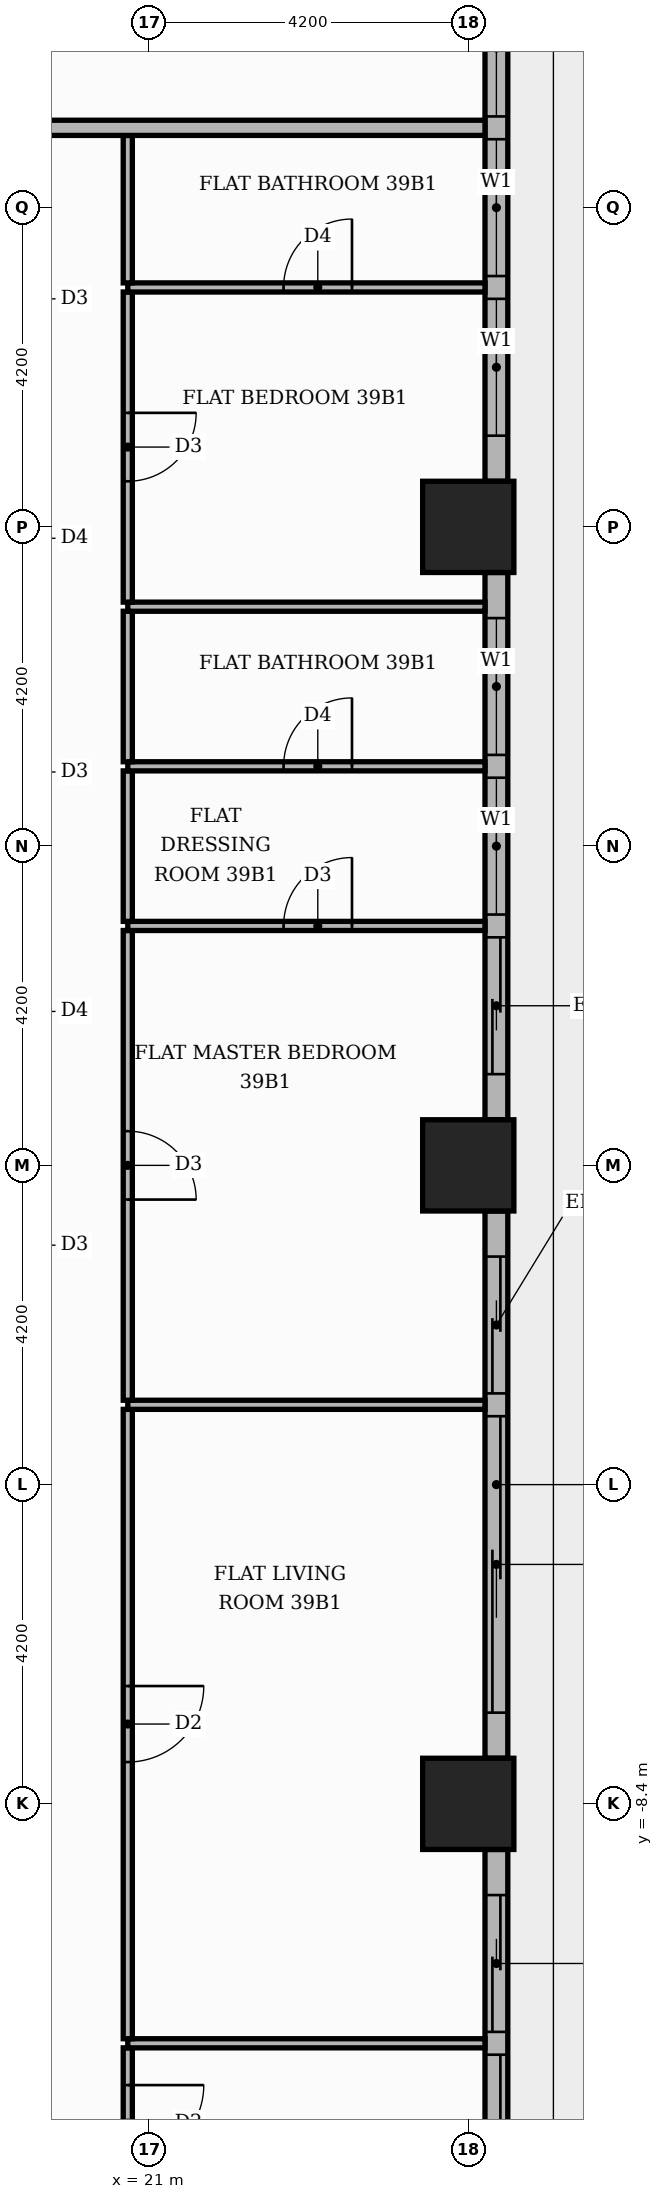
"""IFC4 building model, lengths in metres.
Left out: names, types, materials, properties, quantities, classifications, styles, units other than length and angle.
Written with IfcOpenShell. Run it as: python <this file> out.ifc"""

import sys

from ifc_helpers import new_model, si_unit, direction, frame, frame_2d, origin, origin_2d, place, context, subcontext, project, spatial, rectangle, extrude, element, fill, save


model = new_model("IFC4")
c1 = context("Model", 3, precision=1e-05, world=origin(), true_north=direction((0.0, 1.0)))
c2 = subcontext(c1, "Body", "Model", "MODEL_VIEW")
j1 = project(units=[si_unit("LENGTHUNIT", "METRE"), si_unit("PLANEANGLEUNIT", "RADIAN")], contexts=[c1])
p1 = place(None, origin())
s1 = spatial("IfcSite", under=j1, at=p1, CompositionType="ELEMENT")
p2 = place(p1, origin())
s2 = spatial("IfcBuilding", under=s1, at=p2, CompositionType="ELEMENT")
p3 = place(p2, frame((0.0, 0.0, 165.0)))
s3 = spatial("IfcBuildingStorey", under=s2, at=p3, CompositionType="ELEMENT", Elevation=165.0)
for number, where, z_axis, x_axis in (
    (1, (25.2, 0.0, 0.0), (0.0, 0.0, 1.0), (1.0, 0.0, 0.0)),
    (2, (25.2, 8.4, 0.0), (0.0, 0.0, 1.0), (1.0, 0.0, 0.0)),
    (3, (25.2, -8.4, 0.0), (0.0, 0.0, 1.0), (1.0, 0.0, 0.0)),
):
    element("IfcColumn", number, at=place(p3, frame(where, z_axis=z_axis, x_axis=x_axis)), inside=s3, PredefinedType="COLUMN", context=c2, shape_type="SweptSolid", body=[
        extrude(rectangle(XDim=1.2, YDim=1.2, at=origin_2d()), origin(), (0.0, 0.0, 1.0), 3.9),
    ])
p4 = place(p3, frame((25.57, -16.2, 0.0), z_axis=(0.0, 0.0, 1.0), x_axis=(0.0, 1.0, 0.0)))
e4 = element("IfcWall", 4, at=p4, inside=s3, PredefinedType="STANDARD", context=c2, shape_type="SweptSolid", body=[
    extrude(rectangle(XDim=7.2, YDim=0.3, at=frame_2d((3.6, 0.0))), origin(), (0.0, 0.0, 1.0), 3.48),
])
p5 = place(p4, frame((0.6, 0.0, 0.0)))
e5 = element("IfcOpeningElement", 5, at=p5, cuts=e4, PredefinedType="OPENING", context=c2, shape_type="SweptSolid", body=[
    extrude(rectangle(XDim=3.9, YDim=2.4, at=frame_2d((1.95, 1.2))), frame((0.0, 0.16, 0.0), z_axis=(0.0, -1.0, 0.0), x_axis=(1.0, 0.0, 0.0)), (0.0, 0.0, 1.0), 0.32),
])
p6 = place(p4, frame((4.8, 0.0, 0.0)))
e6 = element("IfcOpeningElement", 6, at=p6, cuts=e4, PredefinedType="OPENING", context=c2, shape_type="SweptSolid", body=[
    extrude(rectangle(XDim=1.8, YDim=2.4, at=frame_2d((0.9, 1.2))), frame((0.0, 0.16, 0.0), z_axis=(0.0, -1.0, 0.0), x_axis=(1.0, 0.0, 0.0)), (0.0, 0.0, 1.0), 0.32),
])
p7 = place(p3, frame((25.57, -7.8, 0.0), z_axis=(0.0, 0.0, 1.0), x_axis=(0.0, 1.0, 0.0)))
e7 = element("IfcWall", 7, at=p7, inside=s3, PredefinedType="STANDARD", context=c2, shape_type="SweptSolid", body=[
    extrude(rectangle(XDim=7.2, YDim=0.3, at=frame_2d((3.6, 0.0))), origin(), (0.0, 0.0, 1.0), 3.48),
])
p8 = place(p7, frame((0.6, 0.0, 0.0)))
e8 = element("IfcOpeningElement", 8, at=p8, cuts=e7, PredefinedType="OPENING", context=c2, shape_type="SweptSolid", body=[
    extrude(rectangle(XDim=3.9, YDim=2.4, at=frame_2d((1.95, 1.2))), frame((0.0, 0.16, 0.0), z_axis=(0.0, -1.0, 0.0), x_axis=(1.0, 0.0, 0.0)), (0.0, 0.0, 1.0), 0.32),
])
p9 = place(p7, frame((4.8, 0.0, 0.0)))
e9 = element("IfcOpeningElement", 9, at=p9, cuts=e7, PredefinedType="OPENING", context=c2, shape_type="SweptSolid", body=[
    extrude(rectangle(XDim=1.8, YDim=2.4, at=frame_2d((0.9, 1.2))), frame((0.0, 0.16, 0.0), z_axis=(0.0, -1.0, 0.0), x_axis=(1.0, 0.0, 0.0)), (0.0, 0.0, 1.0), 0.32),
])
p10 = place(p3, frame((25.57, 0.6, 0.0), z_axis=(0.0, 0.0, 1.0), x_axis=(0.0, 1.0, 0.0)))
e10 = element("IfcWall", 10, at=p10, inside=s3, PredefinedType="STANDARD", context=c2, shape_type="SweptSolid", body=[
    extrude(rectangle(XDim=7.2, YDim=0.3, at=frame_2d((3.6, 0.0))), origin(), (0.0, 0.0, 1.0), 3.48),
])
p11 = place(p10, frame((0.6, 0.0, 0.0)))
e11 = element("IfcOpeningElement", 11, at=p11, cuts=e10, PredefinedType="OPENING", context=c2, shape_type="SweptSolid", body=[
    extrude(rectangle(XDim=1.8, YDim=2.4, at=frame_2d((0.9, 1.2))), frame((0.0, 0.16, 0.0), z_axis=(0.0, -1.0, 0.0), x_axis=(1.0, 0.0, 0.0)), (0.0, 0.0, 1.0), 0.32),
])
p12 = place(p10, frame((2.7, 0.0, 0.9)))
e12 = element("IfcOpeningElement", 12, at=p12, cuts=e10, PredefinedType="OPENING", context=c2, shape_type="SweptSolid", body=[
    extrude(rectangle(XDim=1.8, YDim=2.1, at=frame_2d((0.9, 1.05))), frame((0.0, 0.16, 0.0), z_axis=(0.0, -1.0, 0.0), x_axis=(1.0, 0.0, 0.0)), (0.0, 0.0, 1.0), 0.32),
])
p13 = place(p10, frame((4.8, 0.0, 0.9)))
e13 = element("IfcOpeningElement", 13, at=p13, cuts=e10, PredefinedType="OPENING", context=c2, shape_type="SweptSolid", body=[
    extrude(rectangle(XDim=1.8, YDim=2.1, at=frame_2d((0.9, 1.05))), frame((0.0, 0.16, 0.0), z_axis=(0.0, -1.0, 0.0), x_axis=(1.0, 0.0, 0.0)), (0.0, 0.0, 1.0), 0.32),
])
p14 = place(p3, frame((25.57, 9.0, 0.0), z_axis=(0.0, 0.0, 1.0), x_axis=(0.0, 1.0, 0.0)))
e14 = element("IfcWall", 14, at=p14, inside=s3, PredefinedType="STANDARD", context=c2, shape_type="SweptSolid", body=[
    extrude(rectangle(XDim=7.2, YDim=0.3, at=frame_2d((3.6, 0.0))), origin(), (0.0, 0.0, 1.0), 3.48),
])
p15 = place(p14, frame((0.6, 0.0, 0.9)))
e15 = element("IfcOpeningElement", 15, at=p15, cuts=e14, PredefinedType="OPENING", context=c2, shape_type="SweptSolid", body=[
    extrude(rectangle(XDim=1.8, YDim=2.1, at=frame_2d((0.9, 1.05))), frame((0.0, 0.16, 0.0), z_axis=(0.0, -1.0, 0.0), x_axis=(1.0, 0.0, 0.0)), (0.0, 0.0, 1.0), 0.32),
])
p16 = place(p14, frame((2.7, 0.0, 0.9)))
e16 = element("IfcOpeningElement", 16, at=p16, cuts=e14, PredefinedType="OPENING", context=c2, shape_type="SweptSolid", body=[
    extrude(rectangle(XDim=1.8, YDim=2.1, at=frame_2d((0.9, 1.05))), frame((0.0, 0.16, 0.0), z_axis=(0.0, -1.0, 0.0), x_axis=(1.0, 0.0, 0.0)), (0.0, 0.0, 1.0), 0.32),
])
p17 = place(p14, frame((4.8, 0.0, 0.9)))
e17 = element("IfcOpeningElement", 17, at=p17, cuts=e14, PredefinedType="OPENING", context=c2, shape_type="SweptSolid", body=[
    extrude(rectangle(XDim=1.8, YDim=2.1, at=frame_2d((0.9, 1.05))), frame((0.0, 0.16, 0.0), z_axis=(0.0, -1.0, 0.0), x_axis=(1.0, 0.0, 0.0)), (0.0, 0.0, 1.0), 0.32),
])
p18 = place(p3, frame((20.72, -13.59, 0.0), z_axis=(0.0, 0.0, 1.0), x_axis=(0.0, 1.0, 0.0)))
e18 = element("IfcWall", 18, at=p18, inside=s3, PredefinedType="PARTITIONING", context=c2, shape_type="SweptSolid", body=[
    extrude(rectangle(XDim=1.98, YDim=0.12, at=frame_2d((0.99, 0.0))), origin(), (0.0, 0.0, 1.0), 3.48),
])
p19 = place(p18, frame((0.49, 0.0, 0.0)))
e19 = element("IfcOpeningElement", 19, at=p19, cuts=e18, PredefinedType="OPENING", context=c2, shape_type="SweptSolid", body=[
    extrude(rectangle(XDim=1.0, YDim=2.1, at=frame_2d((0.5, 1.05))), frame((0.0, 0.07, 0.0), z_axis=(0.0, -1.0, 0.0), x_axis=(1.0, 0.0, 0.0)), (0.0, 0.0, 1.0), 0.14),
])
p20 = place(p3, frame((20.72, -11.55, 0.0), z_axis=(0.0, 0.0, 1.0), x_axis=(1.0, 0.0, 0.0)))
e20 = element("IfcWall", 20, at=p20, inside=s3, PredefinedType="PARTITIONING", context=c2, shape_type="SweptSolid", body=[
    extrude(rectangle(XDim=4.7, YDim=0.12, at=frame_2d((2.35, 0.0))), origin(), (0.0, 0.0, 1.0), 3.48),
])
p21 = place(p3, frame((20.72, -11.49, 0.0), z_axis=(0.0, 0.0, 1.0), x_axis=(0.0, 1.0, 0.0)))
e21 = element("IfcWall", 21, at=p21, inside=s3, PredefinedType="PARTITIONING", context=c2, shape_type="SweptSolid", body=[
    extrude(rectangle(XDim=8.28, YDim=0.12, at=frame_2d((4.14, 0.0))), origin(), (0.0, 0.0, 1.0), 3.48),
])
p22 = place(p21, frame((3.64, 0.0, 0.0)))
e22 = element("IfcOpeningElement", 22, at=p22, cuts=e21, PredefinedType="OPENING", context=c2, shape_type="SweptSolid", body=[
    extrude(rectangle(XDim=1.0, YDim=2.1, at=frame_2d((0.5, 1.05))), frame((0.0, 0.07, 0.0), z_axis=(0.0, -1.0, 0.0), x_axis=(1.0, 0.0, 0.0)), (0.0, 0.0, 1.0), 0.14),
])
p23 = place(p3, frame((20.72, -3.15, 0.0), z_axis=(0.0, 0.0, 1.0), x_axis=(1.0, 0.0, 0.0)))
e23 = element("IfcWall", 23, at=p23, inside=s3, PredefinedType="PARTITIONING", context=c2, shape_type="SweptSolid", body=[
    extrude(rectangle(XDim=4.7, YDim=0.12, at=frame_2d((2.35, 0.0))), origin(), (0.0, 0.0, 1.0), 3.48),
])
p24 = place(p3, frame((20.72, -3.09, 0.0), z_axis=(0.0, 0.0, 1.0), x_axis=(0.0, 1.0, 0.0)))
e24 = element("IfcWall", 24, at=p24, inside=s3, PredefinedType="PARTITIONING", context=c2, shape_type="SweptSolid", body=[
    extrude(rectangle(XDim=6.18, YDim=0.12, at=frame_2d((3.09, 0.0))), origin(), (0.0, 0.0, 1.0), 3.48),
])
p25 = place(p24, frame((2.64, 0.0, 0.0)))
e25 = element("IfcOpeningElement", 25, at=p25, cuts=e24, PredefinedType="OPENING", context=c2, shape_type="SweptSolid", body=[
    extrude(rectangle(XDim=0.9, YDim=2.1, at=frame_2d((0.45, 1.05))), frame((0.0, 0.07, 0.0), z_axis=(0.0, -1.0, 0.0), x_axis=(1.0, 0.0, 0.0)), (0.0, 0.0, 1.0), 0.14),
])
p26 = place(p3, frame((20.72, 3.15, 0.0), z_axis=(0.0, 0.0, 1.0), x_axis=(1.0, 0.0, 0.0)))
e26 = element("IfcWall", 26, at=p26, inside=s3, PredefinedType="PARTITIONING", context=c2, shape_type="SweptSolid", body=[
    extrude(rectangle(XDim=4.7, YDim=0.12, at=frame_2d((2.35, 0.0))), origin(), (0.0, 0.0, 1.0), 3.48),
])
p27 = place(p26, frame((2.05, 0.0, 0.0)))
e27 = element("IfcOpeningElement", 27, at=p27, cuts=e26, PredefinedType="OPENING", context=c2, shape_type="SweptSolid", body=[
    extrude(rectangle(XDim=0.9, YDim=2.1, at=frame_2d((0.45, 1.05))), frame((0.0, 0.07, 0.0), z_axis=(0.0, -1.0, 0.0), x_axis=(1.0, 0.0, 0.0)), (0.0, 0.0, 1.0), 0.14),
])
p28 = place(p3, frame((20.72, 3.21, 0.0), z_axis=(0.0, 0.0, 1.0), x_axis=(0.0, 1.0, 0.0)))
e28 = element("IfcWall", 28, at=p28, inside=s3, PredefinedType="PARTITIONING", context=c2, shape_type="SweptSolid", body=[
    extrude(rectangle(XDim=1.98, YDim=0.12, at=frame_2d((0.99, 0.0))), origin(), (0.0, 0.0, 1.0), 3.48),
])
p29 = place(p3, frame((20.72, 5.25, 0.0), z_axis=(0.0, 0.0, 1.0), x_axis=(1.0, 0.0, 0.0)))
e29 = element("IfcWall", 29, at=p29, inside=s3, PredefinedType="PARTITIONING", context=c2, shape_type="SweptSolid", body=[
    extrude(rectangle(XDim=4.7, YDim=0.12, at=frame_2d((2.35, 0.0))), origin(), (0.0, 0.0, 1.0), 3.48),
])
p30 = place(p29, frame((2.05, 0.0, 0.0)))
e30 = element("IfcOpeningElement", 30, at=p30, cuts=e29, PredefinedType="OPENING", context=c2, shape_type="SweptSolid", body=[
    extrude(rectangle(XDim=0.9, YDim=2.1, at=frame_2d((0.45, 1.05))), frame((0.0, 0.07, 0.0), z_axis=(0.0, -1.0, 0.0), x_axis=(1.0, 0.0, 0.0)), (0.0, 0.0, 1.0), 0.14),
])
p31 = place(p3, frame((20.72, 5.31, 0.0), z_axis=(0.0, 0.0, 1.0), x_axis=(0.0, 1.0, 0.0)))
e31 = element("IfcWall", 31, at=p31, inside=s3, PredefinedType="PARTITIONING", context=c2, shape_type="SweptSolid", body=[
    extrude(rectangle(XDim=1.98, YDim=0.12, at=frame_2d((0.99, 0.0))), origin(), (0.0, 0.0, 1.0), 3.48),
])
p32 = place(p3, frame((20.72, 7.35, 0.0), z_axis=(0.0, 0.0, 1.0), x_axis=(1.0, 0.0, 0.0)))
e32 = element("IfcWall", 32, at=p32, inside=s3, PredefinedType="PARTITIONING", context=c2, shape_type="SweptSolid", body=[
    extrude(rectangle(XDim=4.7, YDim=0.12, at=frame_2d((2.35, 0.0))), origin(), (0.0, 0.0, 1.0), 3.48),
])
p33 = place(p3, frame((20.72, 7.41, 0.0), z_axis=(0.0, 0.0, 1.0), x_axis=(0.0, 1.0, 0.0)))
e33 = element("IfcWall", 33, at=p33, inside=s3, PredefinedType="PARTITIONING", context=c2, shape_type="SweptSolid", body=[
    extrude(rectangle(XDim=4.08, YDim=0.12, at=frame_2d((2.04, 0.0))), origin(), (0.0, 0.0, 1.0), 3.48),
])
p34 = place(p33, frame((1.59, 0.0, 0.0)))
e34 = element("IfcOpeningElement", 34, at=p34, cuts=e33, PredefinedType="OPENING", context=c2, shape_type="SweptSolid", body=[
    extrude(rectangle(XDim=0.9, YDim=2.1, at=frame_2d((0.45, 1.05))), frame((0.0, 0.07, 0.0), z_axis=(0.0, -1.0, 0.0), x_axis=(1.0, 0.0, 0.0)), (0.0, 0.0, 1.0), 0.14),
])
p35 = place(p3, frame((20.72, 11.55, 0.0), z_axis=(0.0, 0.0, 1.0), x_axis=(1.0, 0.0, 0.0)))
e35 = element("IfcWall", 35, at=p35, inside=s3, PredefinedType="PARTITIONING", context=c2, shape_type="SweptSolid", body=[
    extrude(rectangle(XDim=4.7, YDim=0.12, at=frame_2d((2.35, 0.0))), origin(), (0.0, 0.0, 1.0), 3.48),
])
p36 = place(p35, frame((2.05, 0.0, 0.0)))
e36 = element("IfcOpeningElement", 36, at=p36, cuts=e35, PredefinedType="OPENING", context=c2, shape_type="SweptSolid", body=[
    extrude(rectangle(XDim=0.9, YDim=2.1, at=frame_2d((0.45, 1.05))), frame((0.0, 0.07, 0.0), z_axis=(0.0, -1.0, 0.0), x_axis=(1.0, 0.0, 0.0)), (0.0, 0.0, 1.0), 0.14),
])
p37 = place(p3, frame((20.72, 11.61, 0.0), z_axis=(0.0, 0.0, 1.0), x_axis=(0.0, 1.0, 0.0)))
e37 = element("IfcWall", 37, at=p37, inside=s3, PredefinedType="PARTITIONING", context=c2, shape_type="SweptSolid", body=[
    extrude(rectangle(XDim=1.94, YDim=0.12, at=frame_2d((0.97, 0.0))), origin(), (0.0, 0.0, 1.0), 3.48),
])
p38 = place(p3, frame((19.296, 13.65, 0.0), z_axis=(0.0, 0.0, 1.0), x_axis=(1.0, 0.0, 0.0)))
e38 = element("IfcWall", 38, at=p38, inside=s3, PredefinedType="PARTITIONING", context=c2, shape_type="SweptSolid", body=[
    extrude(rectangle(XDim=6.124, YDim=0.2, at=frame_2d((3.062, 0.0))), origin(), (0.0, 0.0, 1.0), 3.48),
])
p39 = place(p5, origin())
e39 = element("IfcDoor", 39, at=p39, inside=s3, OperationType="SLIDING_TO_LEFT", PredefinedType="DOOR", context=c2, shape_type="SweptSolid", body=[
    extrude(rectangle(XDim=3.9, YDim=2.4, at=frame_2d((1.95, 1.2))), frame((0.0, 0.025, 0.0), z_axis=(0.0, -1.0, 0.0), x_axis=(1.0, 0.0, 0.0)), (0.0, 0.0, 1.0), 0.05),
])
fill(e5, e39)
p40 = place(p6, origin())
e40 = element("IfcDoor", 40, at=p40, inside=s3, OperationType="SLIDING_TO_RIGHT", PredefinedType="DOOR", context=c2, shape_type="SweptSolid", body=[
    extrude(rectangle(XDim=1.8, YDim=2.4, at=frame_2d((0.9, 1.2))), frame((0.0, 0.025, 0.0), z_axis=(0.0, -1.0, 0.0), x_axis=(1.0, 0.0, 0.0)), (0.0, 0.0, 1.0), 0.05),
])
fill(e6, e40)
p41 = place(p8, origin())
e41 = element("IfcDoor", 41, at=p41, inside=s3, OperationType="SLIDING_TO_LEFT", PredefinedType="DOOR", context=c2, shape_type="SweptSolid", body=[
    extrude(rectangle(XDim=3.9, YDim=2.4, at=frame_2d((1.95, 1.2))), frame((0.0, 0.025, 0.0), z_axis=(0.0, -1.0, 0.0), x_axis=(1.0, 0.0, 0.0)), (0.0, 0.0, 1.0), 0.05),
])
fill(e8, e41)
p42 = place(p9, origin())
e42 = element("IfcDoor", 42, at=p42, inside=s3, OperationType="SLIDING_TO_RIGHT", PredefinedType="DOOR", context=c2, shape_type="SweptSolid", body=[
    extrude(rectangle(XDim=1.8, YDim=2.4, at=frame_2d((0.9, 1.2))), frame((0.0, 0.025, 0.0), z_axis=(0.0, -1.0, 0.0), x_axis=(1.0, 0.0, 0.0)), (0.0, 0.0, 1.0), 0.05),
])
fill(e9, e42)
p43 = place(p11, origin())
e43 = element("IfcDoor", 43, at=p43, inside=s3, OperationType="SLIDING_TO_LEFT", PredefinedType="DOOR", context=c2, shape_type="SweptSolid", body=[
    extrude(rectangle(XDim=1.8, YDim=2.4, at=frame_2d((0.9, 1.2))), frame((0.0, 0.025, 0.0), z_axis=(0.0, -1.0, 0.0), x_axis=(1.0, 0.0, 0.0)), (0.0, 0.0, 1.0), 0.05),
])
fill(e11, e43)
p44 = place(p12, origin())
e44 = element("IfcWindow", 44, at=p44, inside=s3, PartitioningType="SINGLE_PANEL", PredefinedType="WINDOW", context=c2, shape_type="SweptSolid", body=[
    extrude(rectangle(XDim=1.8, YDim=2.1, at=frame_2d((0.9, 1.05))), frame((0.0, 0.03, 0.0), z_axis=(0.0, -1.0, 0.0), x_axis=(1.0, 0.0, 0.0)), (0.0, 0.0, 1.0), 0.06),
])
fill(e12, e44)
p45 = place(p13, origin())
e45 = element("IfcWindow", 45, at=p45, inside=s3, PartitioningType="SINGLE_PANEL", PredefinedType="WINDOW", context=c2, shape_type="SweptSolid", body=[
    extrude(rectangle(XDim=1.8, YDim=2.1, at=frame_2d((0.9, 1.05))), frame((0.0, 0.03, 0.0), z_axis=(0.0, -1.0, 0.0), x_axis=(1.0, 0.0, 0.0)), (0.0, 0.0, 1.0), 0.06),
])
fill(e13, e45)
p46 = place(p15, origin())
e46 = element("IfcWindow", 46, at=p46, inside=s3, PartitioningType="SINGLE_PANEL", PredefinedType="WINDOW", context=c2, shape_type="SweptSolid", body=[
    extrude(rectangle(XDim=1.8, YDim=2.1, at=frame_2d((0.9, 1.05))), frame((0.0, 0.03, 0.0), z_axis=(0.0, -1.0, 0.0), x_axis=(1.0, 0.0, 0.0)), (0.0, 0.0, 1.0), 0.06),
])
fill(e15, e46)
p47 = place(p16, origin())
e47 = element("IfcWindow", 47, at=p47, inside=s3, PartitioningType="SINGLE_PANEL", PredefinedType="WINDOW", context=c2, shape_type="SweptSolid", body=[
    extrude(rectangle(XDim=1.8, YDim=2.1, at=frame_2d((0.9, 1.05))), frame((0.0, 0.03, 0.0), z_axis=(0.0, -1.0, 0.0), x_axis=(1.0, 0.0, 0.0)), (0.0, 0.0, 1.0), 0.06),
])
fill(e16, e47)
p48 = place(p17, origin())
e48 = element("IfcWindow", 48, at=p48, inside=s3, PartitioningType="SINGLE_PANEL", PredefinedType="WINDOW", context=c2, shape_type="SweptSolid", body=[
    extrude(rectangle(XDim=1.8, YDim=2.1, at=frame_2d((0.9, 1.05))), frame((0.0, 0.03, 0.0), z_axis=(0.0, -1.0, 0.0), x_axis=(1.0, 0.0, 0.0)), (0.0, 0.0, 1.0), 0.06),
])
fill(e17, e48)
p49 = place(p19, frame((1.0, 0.0, 0.0), z_axis=(0.0, 0.0, 1.0), x_axis=(-1.0, 0.0, 0.0)))
e49 = element("IfcDoor", 49, at=p49, inside=s3, OperationType="SINGLE_SWING_RIGHT", PredefinedType="DOOR", context=c2, shape_type="SweptSolid", body=[
    extrude(rectangle(XDim=1.0, YDim=2.1, at=frame_2d((0.5, 1.05))), frame((0.0, 0.025, 0.0), z_axis=(0.0, -1.0, 0.0), x_axis=(1.0, 0.0, 0.0)), (0.0, 0.0, 1.0), 0.05),
])
fill(e19, e49)
p50 = place(p22, frame((1.0, 0.0, 0.0), z_axis=(0.0, 0.0, 1.0), x_axis=(-1.0, 0.0, 0.0)))
e50 = element("IfcDoor", 50, at=p50, inside=s3, OperationType="SINGLE_SWING_RIGHT", PredefinedType="DOOR", context=c2, shape_type="SweptSolid", body=[
    extrude(rectangle(XDim=1.0, YDim=2.1, at=frame_2d((0.5, 1.05))), frame((0.0, 0.025, 0.0), z_axis=(0.0, -1.0, 0.0), x_axis=(1.0, 0.0, 0.0)), (0.0, 0.0, 1.0), 0.05),
])
fill(e22, e50)
p51 = place(p25, frame((0.9, 0.0, 0.0), z_axis=(0.0, 0.0, 1.0), x_axis=(-1.0, 0.0, 0.0)))
e51 = element("IfcDoor", 51, at=p51, inside=s3, OperationType="SINGLE_SWING_LEFT", PredefinedType="DOOR", context=c2, shape_type="SweptSolid", body=[
    extrude(rectangle(XDim=0.9, YDim=2.1, at=frame_2d((0.45, 1.05))), frame((0.0, 0.025, 0.0), z_axis=(0.0, -1.0, 0.0), x_axis=(1.0, 0.0, 0.0)), (0.0, 0.0, 1.0), 0.05),
])
fill(e25, e51)
p52 = place(p27, origin())
e52 = element("IfcDoor", 52, at=p52, inside=s3, OperationType="SINGLE_SWING_RIGHT", PredefinedType="DOOR", context=c2, shape_type="SweptSolid", body=[
    extrude(rectangle(XDim=0.9, YDim=2.1, at=frame_2d((0.45, 1.05))), frame((0.0, 0.025, 0.0), z_axis=(0.0, -1.0, 0.0), x_axis=(1.0, 0.0, 0.0)), (0.0, 0.0, 1.0), 0.05),
])
fill(e27, e52)
p53 = place(p30, origin())
e53 = element("IfcDoor", 53, at=p53, inside=s3, OperationType="SINGLE_SWING_RIGHT", PredefinedType="DOOR", context=c2, shape_type="SweptSolid", body=[
    extrude(rectangle(XDim=0.9, YDim=2.1, at=frame_2d((0.45, 1.05))), frame((0.0, 0.025, 0.0), z_axis=(0.0, -1.0, 0.0), x_axis=(1.0, 0.0, 0.0)), (0.0, 0.0, 1.0), 0.05),
])
fill(e30, e53)
p54 = place(p34, frame((0.9, 0.0, 0.0), z_axis=(0.0, 0.0, 1.0), x_axis=(-1.0, 0.0, 0.0)))
e54 = element("IfcDoor", 54, at=p54, inside=s3, OperationType="SINGLE_SWING_RIGHT", PredefinedType="DOOR", context=c2, shape_type="SweptSolid", body=[
    extrude(rectangle(XDim=0.9, YDim=2.1, at=frame_2d((0.45, 1.05))), frame((0.0, 0.025, 0.0), z_axis=(0.0, -1.0, 0.0), x_axis=(1.0, 0.0, 0.0)), (0.0, 0.0, 1.0), 0.05),
])
fill(e34, e54)
p55 = place(p36, origin())
e55 = element("IfcDoor", 55, at=p55, inside=s3, OperationType="SINGLE_SWING_RIGHT", PredefinedType="DOOR", context=c2, shape_type="SweptSolid", body=[
    extrude(rectangle(XDim=0.9, YDim=2.1, at=frame_2d((0.45, 1.05))), frame((0.0, 0.025, 0.0), z_axis=(0.0, -1.0, 0.0), x_axis=(1.0, 0.0, 0.0)), (0.0, 0.0, 1.0), 0.05),
])
fill(e36, e55)
save(model, sys.argv[1])
